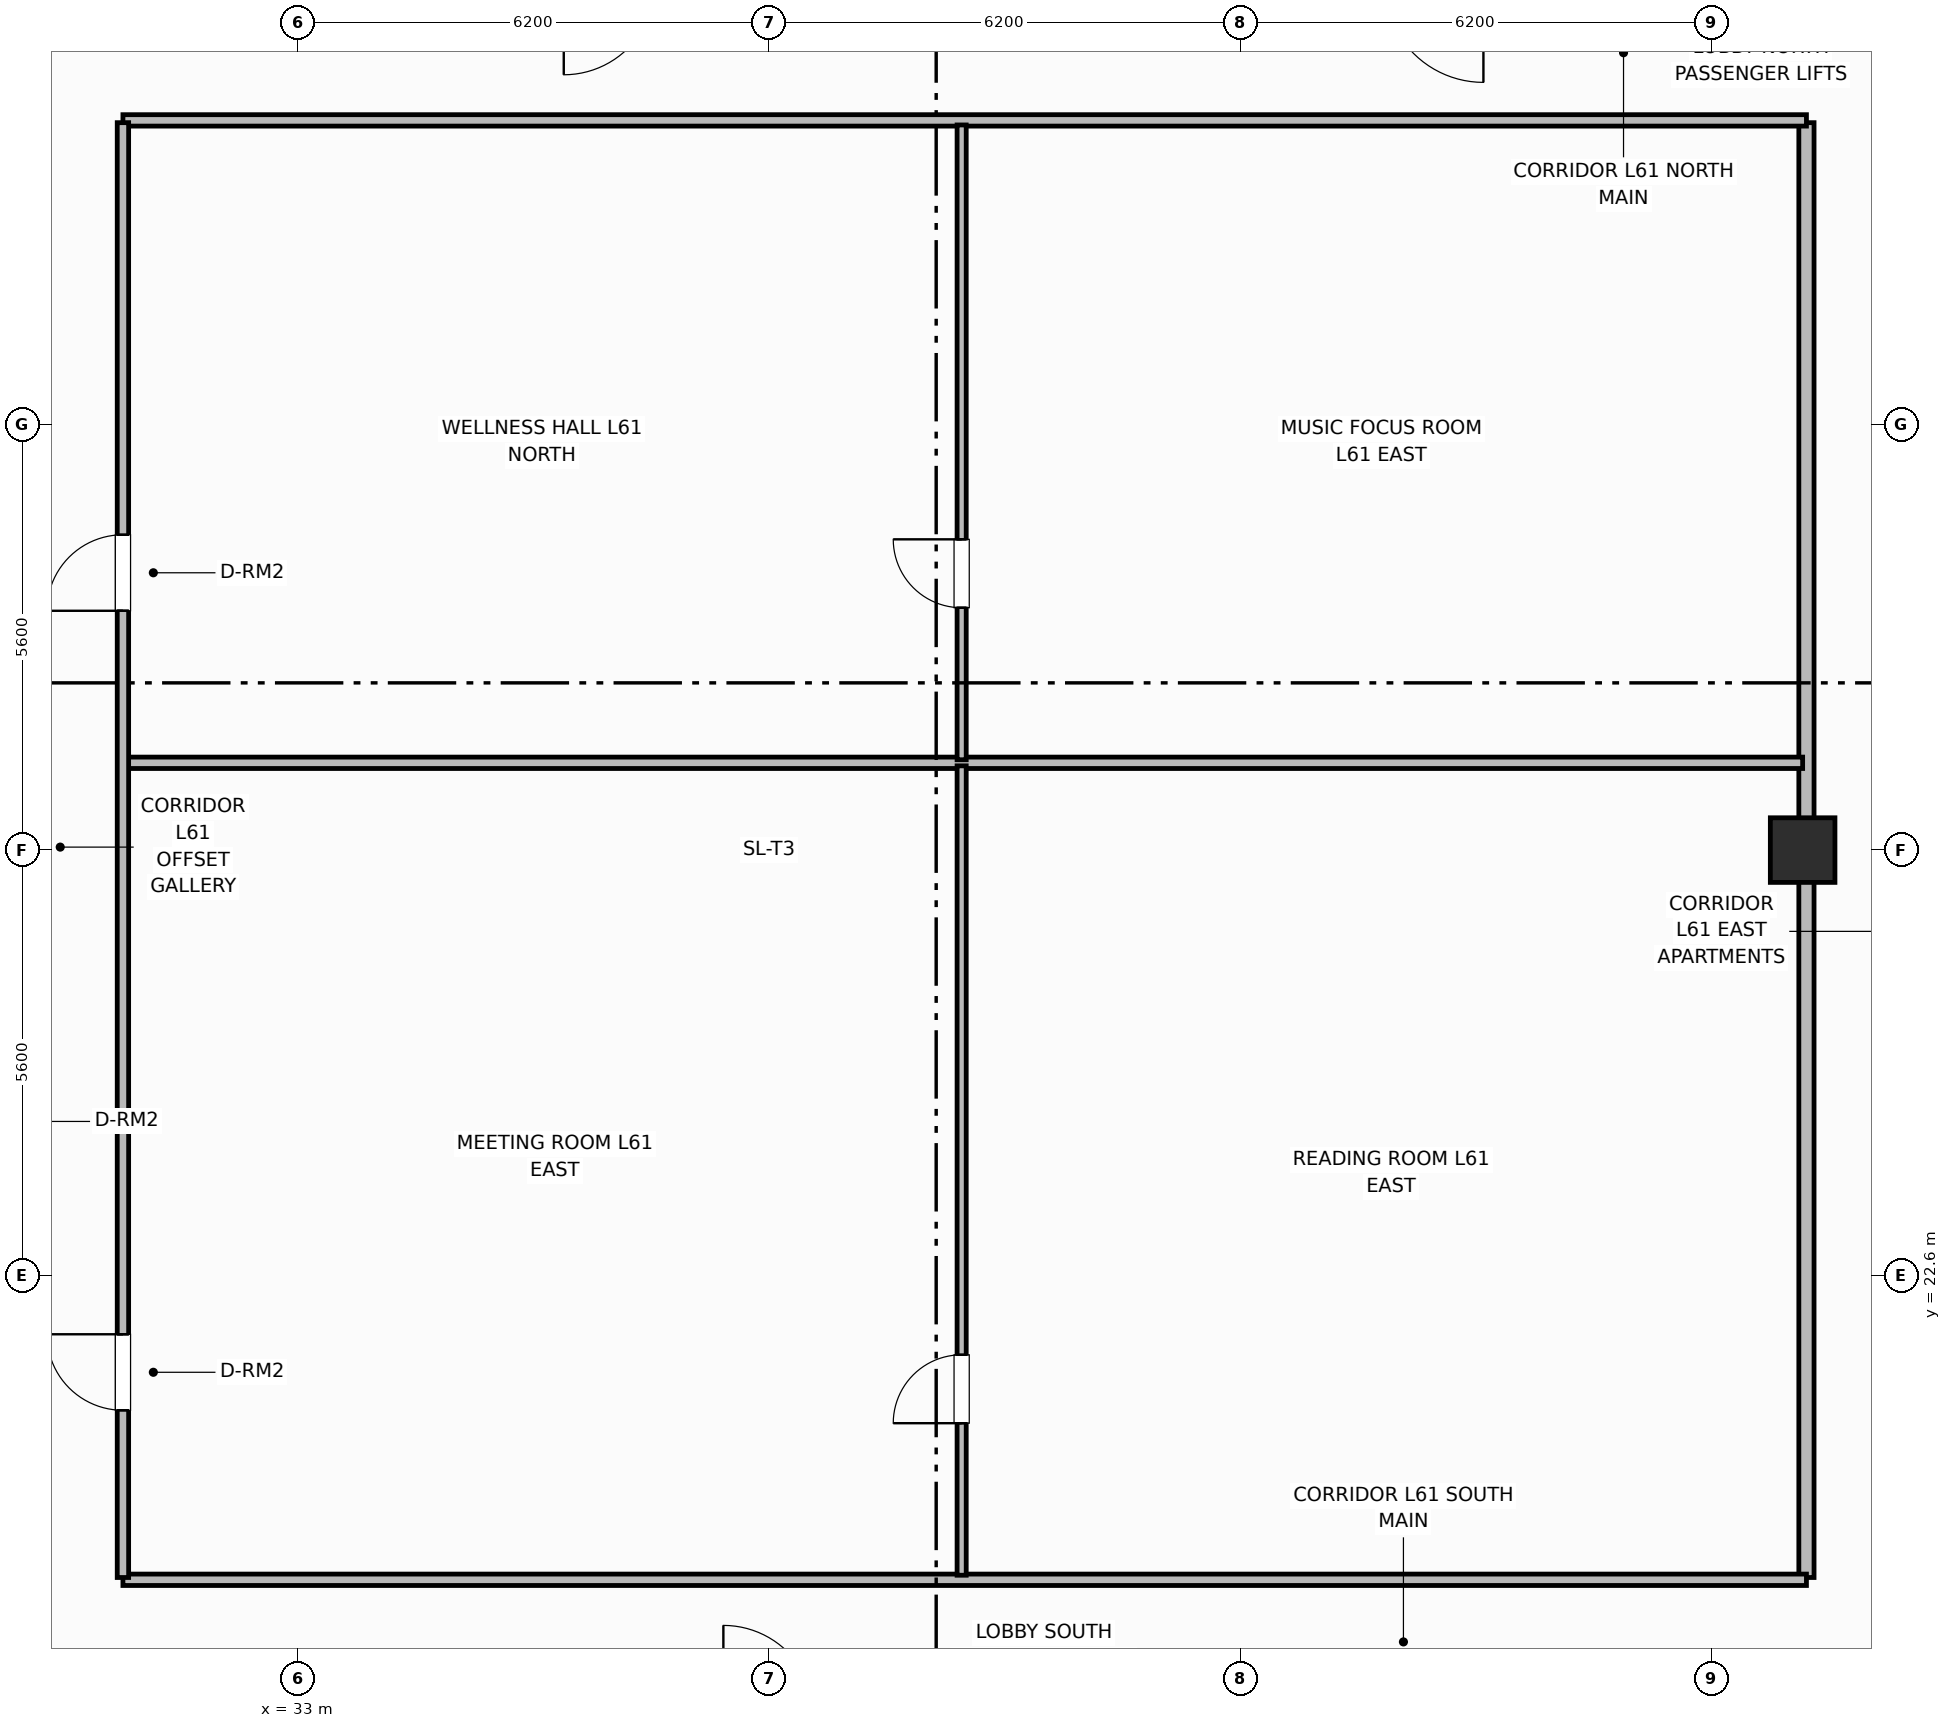
"""IFC4 building model, lengths in metres.
Left out: names, types, materials, properties, quantities, classifications, styles, units other than length and angle.
Written with IfcOpenShell. Run it as: python <this file> out.ifc"""

import sys

from ifc_helpers import new_model, si_unit, direction, frame, frame_2d, origin, origin_2d, place, context, subcontext, project, spatial, rectangle, extrude, element, fill, save


model = new_model("IFC4")
c1 = context("Model", 3, precision=1e-05, world=origin(), true_north=direction((0.0, 1.0)))
c2 = subcontext(c1, "Body", "Model", "MODEL_VIEW")
j1 = project(units=[si_unit("LENGTHUNIT", "METRE"), si_unit("PLANEANGLEUNIT", "RADIAN")], contexts=[c1])
p1 = place(None, origin())
s1 = spatial("IfcSite", under=j1, at=p1, CompositionType="ELEMENT")
p2 = place(p1, origin())
s2 = spatial("IfcBuilding", under=s1, at=p2, CompositionType="ELEMENT")
p3 = place(p2, frame((0.0, 0.0, 244.3)))
s3 = spatial("IfcBuildingStorey", under=s2, at=p3, CompositionType="ELEMENT", Elevation=244.3)
p4 = place(p3, frame((52.8, 28.2, 0.0), z_axis=(0.0, 0.0, 1.0), x_axis=(1.0, 0.0, 0.0)))
e1 = element("IfcColumn", 1, at=p4, inside=s3, PredefinedType="COLUMN", context=c2, shape_type="SweptSolid", body=[
    extrude(rectangle(XDim=0.85, YDim=0.85, at=origin_2d()), origin(), (0.0, 0.0, 1.0), 3.7),
])
p5 = place(p3, frame((52.85, 18.63, 0.0), z_axis=(0.0, 0.0, 1.0), x_axis=(0.0, 1.0, 0.0)))
e2 = element("IfcWall", 2, at=p5, inside=s3, PredefinedType="PARTITIONING", context=c2, shape_type="SweptSolid", body=[
    extrude(rectangle(XDim=19.14, YDim=0.2, at=frame_2d((9.57, 0.0))), origin(), (0.0, 0.0, 1.0), 2.56),
])
for number, where, z_axis, x_axis in (
    (3, (30.7, 18.6, 0.0), (0.0, 0.0, 1.0), (1.0, 0.0, 0.0)),
    (4, (30.7, 37.8, 0.0), (0.0, 0.0, 1.0), (1.0, 0.0, 0.0)),
):
    element("IfcWall", number, at=place(p3, frame(where, z_axis=z_axis, x_axis=x_axis)), inside=s3, PredefinedType="PARTITIONING", context=c2, shape_type="SweptSolid", body=[
        extrude(rectangle(XDim=22.15, YDim=0.15, at=frame_2d((11.075, 0.0))), origin(), (0.0, 0.0, 1.0), 2.56),
    ])
p6 = place(p3, frame((30.73, 29.348, 0.0), z_axis=(0.0, 0.0, 1.0), x_axis=(1.0, 0.0, 0.0)))
e5 = element("IfcWall", 5, at=p6, inside=s3, PredefinedType="PARTITIONING", context=c2, shape_type="SweptSolid", body=[
    extrude(rectangle(XDim=22.07, YDim=0.15, at=frame_2d((11.035, 0.0))), origin(), (0.0, 0.0, 1.0), 2.56),
])
p7 = place(p3, frame((41.735, 18.66, 0.0), z_axis=(0.0, 0.0, 1.0), x_axis=(0.0, 1.0, 0.0)))
e6 = element("IfcWall", 6, at=p7, inside=s3, PredefinedType="PARTITIONING", context=c2, shape_type="SweptSolid", body=[
    extrude(rectangle(XDim=10.648, YDim=0.12, at=frame_2d((5.324, 0.0))), origin(), (0.0, 0.0, 1.0), 2.56),
])
p8 = place(p7, frame((2.0, 0.0, 0.0)))
e7 = element("IfcOpeningElement", 7, at=p8, cuts=e6, PredefinedType="OPENING", context=c2, shape_type="SweptSolid", body=[
    extrude(rectangle(XDim=0.9, YDim=2.1, at=frame_2d((0.45, 1.05))), frame((0.0, 0.07, 0.0), z_axis=(0.0, -1.0, 0.0), x_axis=(1.0, 0.0, 0.0)), (0.0, 0.0, 1.0), 0.14),
])
p9 = place(p3, frame((41.735, 29.388, 0.0), z_axis=(0.0, 0.0, 1.0), x_axis=(0.0, 1.0, 0.0)))
e8 = element("IfcWall", 8, at=p9, inside=s3, PredefinedType="PARTITIONING", context=c2, shape_type="SweptSolid", body=[
    extrude(rectangle(XDim=8.352, YDim=0.12, at=frame_2d((4.176, 0.0))), origin(), (0.0, 0.0, 1.0), 2.56),
])
p10 = place(p9, frame((2.0, 0.0, 0.0)))
e9 = element("IfcOpeningElement", 9, at=p10, cuts=e8, PredefinedType="OPENING", context=c2, shape_type="SweptSolid", body=[
    extrude(rectangle(XDim=0.9, YDim=2.1, at=frame_2d((0.45, 1.05))), frame((0.0, 0.07, 0.0), z_axis=(0.0, -1.0, 0.0), x_axis=(1.0, 0.0, 0.0)), (0.0, 0.0, 1.0), 0.14),
])
p11 = place(p3, frame((30.7, 18.63, 0.0), z_axis=(0.0, 0.0, 1.0), x_axis=(0.0, 1.0, 0.0)))
e10 = element("IfcWall", 10, at=p11, inside=s3, PredefinedType="PARTITIONING", context=c2, shape_type="SweptSolid", body=[
    extrude(rectangle(XDim=19.14, YDim=0.15, at=frame_2d((9.57, 0.0))), origin(), (0.0, 0.0, 1.0), 2.56),
])
p12 = place(p11, frame((2.2, 0.0, 0.0)))
e11 = element("IfcOpeningElement", 11, at=p12, cuts=e10, PredefinedType="OPENING", context=c2, shape_type="SweptSolid", body=[
    extrude(rectangle(XDim=1.0, YDim=2.15, at=frame_2d((0.5, 1.075))), frame((0.0, 0.085, 0.0), z_axis=(0.0, -1.0, 0.0), x_axis=(1.0, 0.0, 0.0)), (0.0, 0.0, 1.0), 0.17),
])
p13 = place(p11, frame((12.719, 0.0, 0.0)))
e12 = element("IfcOpeningElement", 12, at=p13, cuts=e10, PredefinedType="OPENING", context=c2, shape_type="SweptSolid", body=[
    extrude(rectangle(XDim=1.0, YDim=2.15, at=frame_2d((0.5, 1.075))), frame((0.0, 0.085, 0.0), z_axis=(0.0, -1.0, 0.0), x_axis=(1.0, 0.0, 0.0)), (0.0, 0.0, 1.0), 0.17),
])
p14 = place(p8, origin())
e13 = element("IfcDoor", 13, at=p14, inside=s3, OperationType="SINGLE_SWING_LEFT", PredefinedType="DOOR", context=c2, shape_type="SweptSolid", body=[
    extrude(rectangle(XDim=0.9, YDim=2.1, at=frame_2d((0.45, 1.05))), frame((0.0, 0.025, 0.0), z_axis=(0.0, -1.0, 0.0), x_axis=(1.0, 0.0, 0.0)), (0.0, 0.0, 1.0), 0.05),
])
fill(e7, e13)
p15 = place(p10, origin())
e14 = element("IfcDoor", 14, at=p15, inside=s3, OperationType="SINGLE_SWING_RIGHT", PredefinedType="DOOR", context=c2, shape_type="SweptSolid", body=[
    extrude(rectangle(XDim=0.9, YDim=2.1, at=frame_2d((0.45, 1.05))), frame((0.0, 0.025, 0.0), z_axis=(0.0, -1.0, 0.0), x_axis=(1.0, 0.0, 0.0)), (0.0, 0.0, 1.0), 0.05),
])
fill(e9, e14)
p16 = place(p12, origin())
e15 = element("IfcDoor", 15, at=p16, inside=s3, OperationType="SINGLE_SWING_RIGHT", PredefinedType="DOOR", context=c2, shape_type="SweptSolid", body=[
    extrude(rectangle(XDim=1.0, YDim=2.15, at=frame_2d((0.5, 1.075))), frame((0.0, 0.025, 0.0), z_axis=(0.0, -1.0, 0.0), x_axis=(1.0, 0.0, 0.0)), (0.0, 0.0, 1.0), 0.05),
])
fill(e11, e15)
p17 = place(p13, origin())
e16 = element("IfcDoor", 16, at=p17, inside=s3, OperationType="SINGLE_SWING_LEFT", PredefinedType="DOOR", context=c2, shape_type="SweptSolid", body=[
    extrude(rectangle(XDim=1.0, YDim=2.15, at=frame_2d((0.5, 1.075))), frame((0.0, 0.025, 0.0), z_axis=(0.0, -1.0, 0.0), x_axis=(1.0, 0.0, 0.0)), (0.0, 0.0, 1.0), 0.05),
])
fill(e12, e16)
save(model, sys.argv[1])
